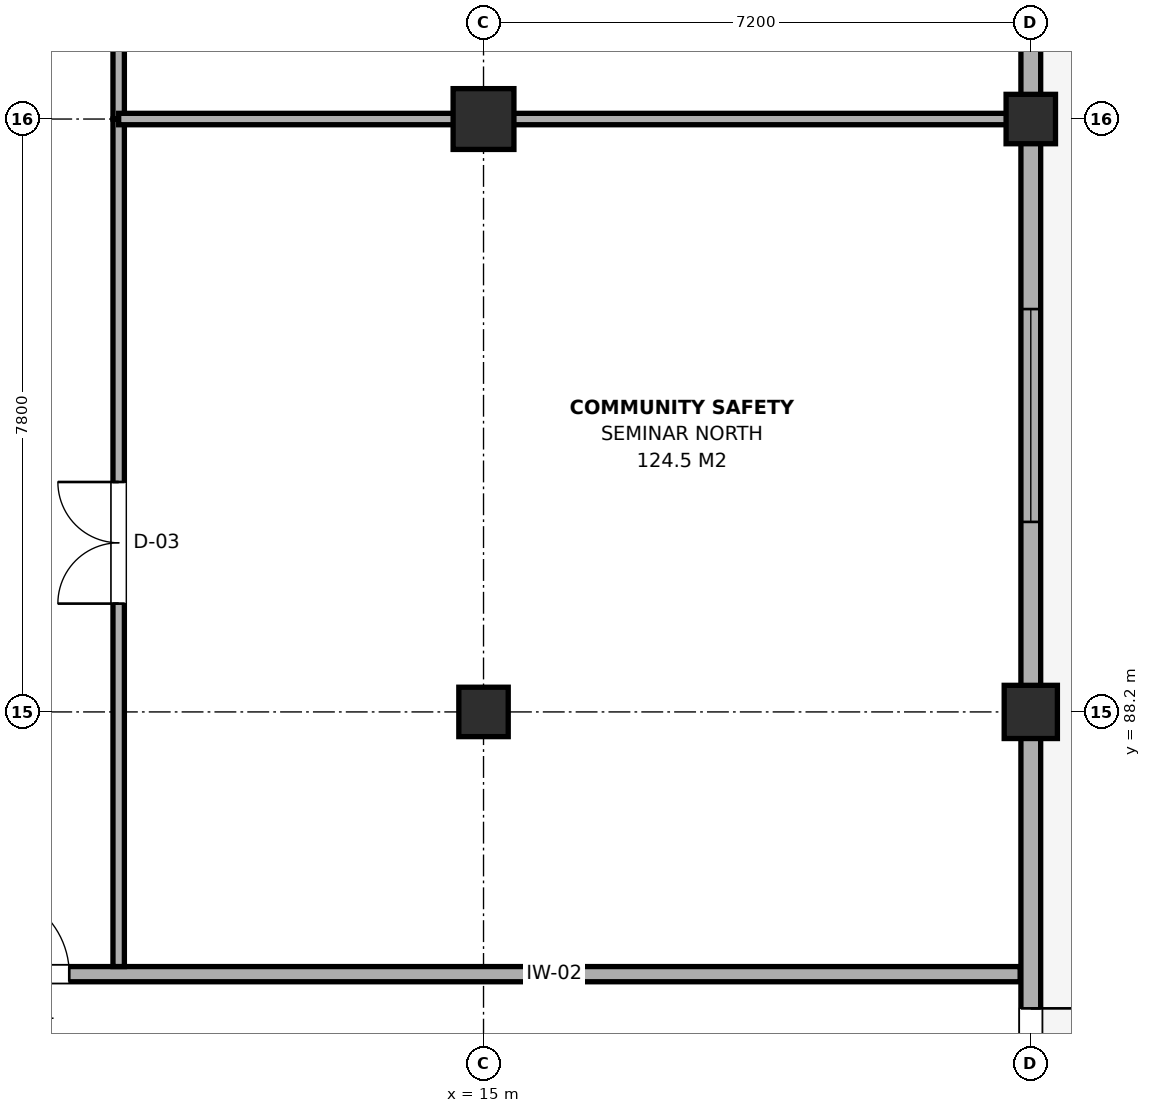
"""IFC4 building model, lengths in metres.
Left out: names, types, materials, properties, quantities, classifications, styles, units other than length and angle.
Written with IfcOpenShell. Run it as: python <this file> out.ifc"""

import sys

from ifc_helpers import new_model, si_unit, direction, frame, frame_2d, origin, origin_2d, place, context, subcontext, project, spatial, rectangle, extrude, element, fill, save


model = new_model("IFC4")
c1 = context("Model", 3, precision=1e-05, world=origin(), true_north=direction((0.0, 1.0)))
c2 = subcontext(c1, "Body", "Model", "MODEL_VIEW")
j1 = project(units=[si_unit("LENGTHUNIT", "METRE"), si_unit("PLANEANGLEUNIT", "RADIAN")], contexts=[c1])
p1 = place(None, origin())
s1 = spatial("IfcSite", under=j1, at=p1, CompositionType="ELEMENT")
p2 = place(p1, origin())
s2 = spatial("IfcBuilding", under=s1, at=p2, CompositionType="ELEMENT")
p3 = place(p2, origin())
s3 = spatial("IfcBuildingStorey", under=s2, at=p3, CompositionType="ELEMENT", Elevation=0.0)
p4 = place(p3, frame((15.0, 88.2, 0.0), z_axis=(0.0, 0.0, 1.0), x_axis=(1.0, 0.0, 0.0)))
e1 = element("IfcColumn", 1, at=p4, inside=s3, PredefinedType="COLUMN", context=c2, shape_type="SweptSolid", body=[
    extrude(rectangle(XDim=0.65, YDim=0.65, at=origin_2d()), origin(), (0.0, 0.0, 1.0), 4.8),
])
p5 = place(p3, frame((15.0, 96.0, 0.0), z_axis=(0.0, 0.0, 1.0), x_axis=(1.0, 0.0, 0.0)))
e2 = element("IfcColumn", 2, at=p5, inside=s3, PredefinedType="COLUMN", context=c2, shape_type="SweptSolid", body=[
    extrude(rectangle(XDim=0.8, YDim=0.8, at=origin_2d()), origin(), (0.0, 0.0, 1.0), 4.8),
])
p6 = place(p3, frame((22.2, 88.2, 0.0), z_axis=(0.0, 0.0, 1.0), x_axis=(1.0, 0.0, 0.0)))
e3 = element("IfcColumn", 3, at=p6, inside=s3, PredefinedType="COLUMN", context=c2, shape_type="SweptSolid", body=[
    extrude(rectangle(XDim=0.7, YDim=0.7, at=origin_2d()), origin(), (0.0, 0.0, 1.0), 4.8),
])
p7 = place(p3, frame((22.2, 96.0, 0.0), z_axis=(0.0, 0.0, 1.0), x_axis=(1.0, 0.0, 0.0)))
e4 = element("IfcColumn", 4, at=p7, inside=s3, PredefinedType="COLUMN", context=c2, shape_type="SweptSolid", body=[
    extrude(rectangle(XDim=0.65, YDim=0.65, at=origin_2d()), origin(), (0.0, 0.0, 1.0), 4.8),
])
p8 = place(p3, frame((22.2, 81.0, 0.0), z_axis=(0.0, 0.0, 1.0), x_axis=(0.0, 1.0, 0.0)))
e5 = element("IfcWall", 5, at=p8, inside=s3, PredefinedType="SOLIDWALL", context=c2, shape_type="SweptSolid", body=[
    extrude(rectangle(XDim=7.2, YDim=0.26, at=frame_2d((3.6, 0.0))), origin(), (0.0, 0.0, 1.0), 4.205),
])
p9 = place(p8, frame((1.3, 0.0, 0.0)))
e6 = element("IfcOpeningElement", 6, at=p9, cuts=e5, PredefinedType="OPENING", context=c2, shape_type="SweptSolid", body=[
    extrude(rectangle(XDim=2.0, YDim=2.25, at=frame_2d((1.0, 1.125))), frame((0.0, 0.145, 0.0), z_axis=(0.0, -1.0, 0.0), x_axis=(1.0, 0.0, 0.0)), (0.0, 0.0, 1.0), 0.29),
])
p10 = place(p3, frame((22.2, 88.2, 0.0), z_axis=(0.0, 0.0, 1.0), x_axis=(0.0, 1.0, 0.0)))
e7 = element("IfcWall", 7, at=p10, inside=s3, PredefinedType="SOLIDWALL", context=c2, shape_type="SweptSolid", body=[
    extrude(rectangle(XDim=7.8, YDim=0.26, at=frame_2d((3.9, 0.0))), origin(), (0.0, 0.0, 1.0), 4.225),
])
p11 = place(p10, frame((2.5, 0.0, 0.9)))
e8 = element("IfcOpeningElement", 8, at=p11, cuts=e7, PredefinedType="OPENING", context=c2, shape_type="SweptSolid", body=[
    extrude(rectangle(XDim=2.8, YDim=2.2, at=frame_2d((1.4, 1.1))), frame((0.0, 0.145, 0.0), z_axis=(0.0, -1.0, 0.0), x_axis=(1.0, 0.0, 0.0)), (0.0, 0.0, 1.0), 0.29),
])
p12 = place(p3, frame((22.2, 96.0, 0.0), z_axis=(0.0, 0.0, 1.0), x_axis=(0.0, 1.0, 0.0)))
e9 = element("IfcWall", 9, at=p12, inside=s3, PredefinedType="SOLIDWALL", context=c2, shape_type="SweptSolid", body=[
    extrude(rectangle(XDim=8.4, YDim=0.26, at=frame_2d((4.2, 0.0))), origin(), (0.0, 0.0, 1.0), 4.065),
])
p13 = place(p12, frame((1.352, 0.0, 0.9)))
e10 = element("IfcOpeningElement", 10, at=p13, cuts=e9, PredefinedType="OPENING", context=c2, shape_type="SweptSolid", body=[
    extrude(rectangle(XDim=2.0, YDim=1.8, at=frame_2d((1.0, 0.9))), frame((0.0, 0.145, 0.0), z_axis=(0.0, -1.0, 0.0), x_axis=(1.0, 0.0, 0.0)), (0.0, 0.0, 1.0), 0.29),
])
p14 = place(p12, frame((5.048, 0.0, 0.9)))
e11 = element("IfcOpeningElement", 11, at=p14, cuts=e9, PredefinedType="OPENING", context=c2, shape_type="SweptSolid", body=[
    extrude(rectangle(XDim=2.0, YDim=1.8, at=frame_2d((1.0, 0.9))), frame((0.0, 0.145, 0.0), z_axis=(0.0, -1.0, 0.0), x_axis=(1.0, 0.0, 0.0)), (0.0, 0.0, 1.0), 0.29),
])
p15 = place(p3, frame((6.0, 84.75, 0.0), z_axis=(0.0, 0.0, 1.0), x_axis=(1.0, 0.0, 0.0)))
e12 = element("IfcWall", 12, at=p15, inside=s3, PredefinedType="PARTITIONING", context=c2, shape_type="SweptSolid", body=[
    extrude(rectangle(XDim=16.06, YDim=0.2, at=frame_2d((8.03, 0.0))), origin(), (0.0, 0.0, 1.0), 4.205),
])
p16 = place(p15, frame((2.45, 0.0, 0.0)))
e13 = element("IfcOpeningElement", 13, at=p16, cuts=e12, PredefinedType="OPENING", context=c2, shape_type="SweptSolid", body=[
    extrude(rectangle(XDim=1.1, YDim=2.15, at=frame_2d((0.55, 1.075))), frame((0.0, 0.115, 0.0), z_axis=(0.0, -1.0, 0.0), x_axis=(1.0, 0.0, 0.0)), (0.0, 0.0, 1.0), 0.23),
])
p17 = place(p3, frame((10.2, 84.85, 0.0), z_axis=(0.0, 0.0, 1.0), x_axis=(0.0, 1.0, 0.0)))
e14 = element("IfcWall", 14, at=p17, inside=s3, PredefinedType="PARTITIONING", context=c2, shape_type="SweptSolid", body=[
    extrude(rectangle(XDim=11.15, YDim=0.15, at=frame_2d((5.575, 0.0))), origin(), (0.0, 0.0, 1.0), 4.005),
])
p18 = place(p17, frame((4.775, 0.0, 0.0)))
e15 = element("IfcOpeningElement", 15, at=p18, cuts=e14, PredefinedType="OPENING", context=c2, shape_type="SweptSolid", body=[
    extrude(rectangle(XDim=1.6, YDim=2.15, at=frame_2d((0.8, 1.075))), frame((0.0, 0.09, 0.0), z_axis=(0.0, -1.0, 0.0), x_axis=(1.0, 0.0, 0.0)), (0.0, 0.0, 1.0), 0.18),
])
p19 = place(p3, frame((10.2, 96.0, 0.0), z_axis=(0.0, 0.0, 1.0), x_axis=(0.0, 1.0, 0.0)))
e16 = element("IfcWall", 16, at=p19, inside=s3, PredefinedType="PARTITIONING", context=c2, shape_type="SweptSolid", body=[
    extrude(rectangle(XDim=17.4, YDim=0.15, at=frame_2d((8.7, 0.0))), origin(), (0.0, 0.0, 1.0), 4.005),
])
p20 = place(p19, frame((8.175, 0.0, 0.0)))
e17 = element("IfcOpeningElement", 17, at=p20, cuts=e16, PredefinedType="OPENING", context=c2, shape_type="SweptSolid", body=[
    extrude(rectangle(XDim=1.05, YDim=2.15, at=frame_2d((0.525, 1.075))), frame((0.0, 0.09, 0.0), z_axis=(0.0, -1.0, 0.0), x_axis=(1.0, 0.0, 0.0)), (0.0, 0.0, 1.0), 0.18),
])
p21 = place(p19, frame((3.05, 0.0, 0.95)))
e18 = element("IfcOpeningElement", 18, at=p21, cuts=e16, PredefinedType="OPENING", context=c2, shape_type="SweptSolid", body=[
    extrude(rectangle(XDim=2.6, YDim=1.5, at=frame_2d((1.3, 0.75))), frame((0.0, 0.09, 0.0), z_axis=(0.0, -1.0, 0.0), x_axis=(1.0, 0.0, 0.0)), (0.0, 0.0, 1.0), 0.18),
])
p22 = place(p19, frame((11.75, 0.0, 0.95)))
e19 = element("IfcOpeningElement", 19, at=p22, cuts=e16, PredefinedType="OPENING", context=c2, shape_type="SweptSolid", body=[
    extrude(rectangle(XDim=2.6, YDim=1.5, at=frame_2d((1.3, 0.75))), frame((0.0, 0.09, 0.0), z_axis=(0.0, -1.0, 0.0), x_axis=(1.0, 0.0, 0.0)), (0.0, 0.0, 1.0), 0.18),
])
p23 = place(p3, frame((10.2, 96.0, 0.0), z_axis=(0.0, 0.0, 1.0), x_axis=(1.0, 0.0, 0.0)))
e20 = element("IfcWall", 20, at=p23, inside=s3, PredefinedType="PARTITIONING", context=c2, shape_type="SweptSolid", body=[
    extrude(rectangle(XDim=11.86, YDim=0.15, at=frame_2d((5.93, 0.0))), origin(), (0.0, 0.0, 1.0), 4.005),
])
p24 = place(p9, frame((2.0, 0.0, 0.0), z_axis=(0.0, 0.0, 1.0), x_axis=(-1.0, 0.0, 0.0)))
e21 = element("IfcDoor", 21, at=p24, inside=s3, OperationType="DOUBLE_DOOR_SINGLE_SWING", PredefinedType="DOOR", context=c2, shape_type="SweptSolid", body=[
    extrude(rectangle(XDim=2.0, YDim=2.25, at=frame_2d((1.0, 1.125))), frame((0.0, 0.025, 0.0), z_axis=(0.0, -1.0, 0.0), x_axis=(1.0, 0.0, 0.0)), (0.0, 0.0, 1.0), 0.05),
])
fill(e6, e21)
p25 = place(p11, origin())
e22 = element("IfcWindow", 22, at=p25, inside=s3, PartitioningType="SINGLE_PANEL", PredefinedType="WINDOW", context=c2, shape_type="SweptSolid", body=[
    extrude(rectangle(XDim=2.8, YDim=2.2, at=frame_2d((1.4, 1.1))), frame((0.0, 0.03, 0.0), z_axis=(0.0, -1.0, 0.0), x_axis=(1.0, 0.0, 0.0)), (0.0, 0.0, 1.0), 0.06),
])
fill(e8, e22)
p26 = place(p16, origin())
e23 = element("IfcDoor", 23, at=p26, inside=s3, OperationType="SINGLE_SWING_LEFT", PredefinedType="DOOR", context=c2, shape_type="SweptSolid", body=[
    extrude(rectangle(XDim=1.1, YDim=2.15, at=frame_2d((0.55, 1.075))), frame((0.0, 0.025, 0.0), z_axis=(0.0, -1.0, 0.0), x_axis=(1.0, 0.0, 0.0)), (0.0, 0.0, 1.0), 0.05),
])
fill(e13, e23)
p27 = place(p18, origin())
e24 = element("IfcDoor", 24, at=p27, inside=s3, OperationType="DOUBLE_DOOR_SINGLE_SWING", PredefinedType="DOOR", context=c2, shape_type="SweptSolid", body=[
    extrude(rectangle(XDim=1.6, YDim=2.15, at=frame_2d((0.8, 1.075))), frame((0.0, 0.025, 0.0), z_axis=(0.0, -1.0, 0.0), x_axis=(1.0, 0.0, 0.0)), (0.0, 0.0, 1.0), 0.05),
])
fill(e15, e24)
save(model, sys.argv[1])
